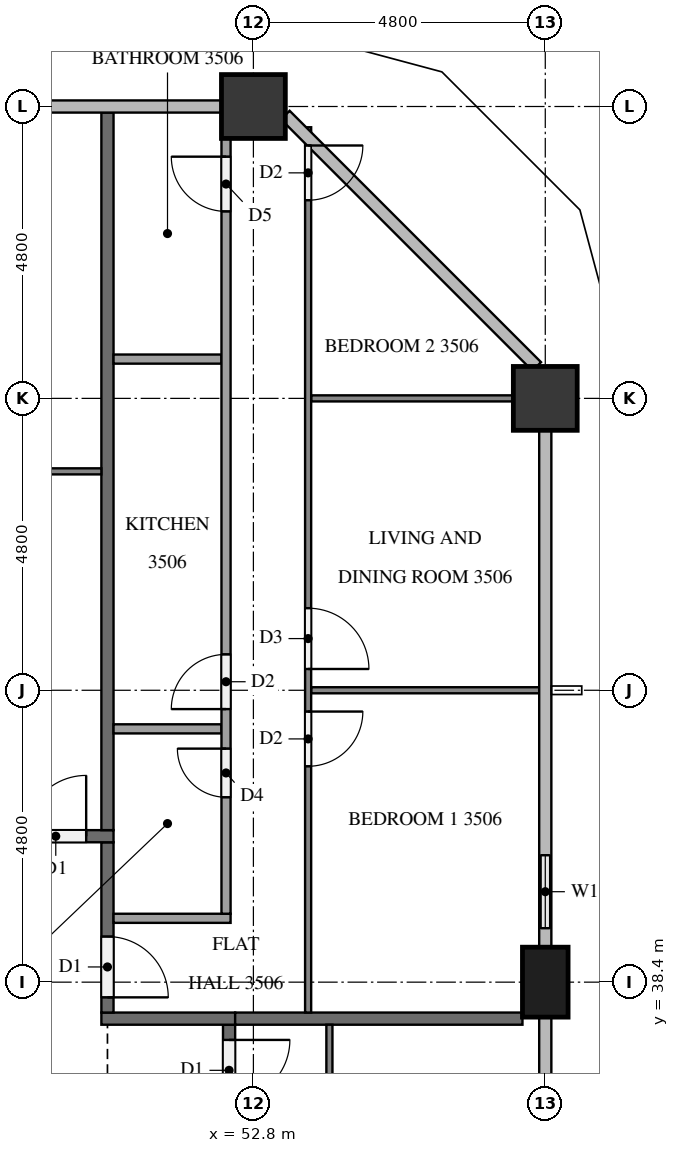
"""IFC4 building model, lengths in metres.
Left out: names, types, materials, properties, quantities, classifications, styles, units other than length and angle.
Written with IfcOpenShell. Run it as: python <this file> out.ifc"""

import sys

from ifc_helpers import new_model, si_unit, direction, frame, frame_2d, origin, origin_2d, place, context, subcontext, project, spatial, rectangle, extrude, element, fill, save


model = new_model("IFC4")
c1 = context("Model", 3, precision=1e-05, world=origin(), true_north=direction((0.0, 1.0)))
c2 = subcontext(c1, "Body", "Model", "MODEL_VIEW")
j1 = project(units=[si_unit("LENGTHUNIT", "METRE"), si_unit("PLANEANGLEUNIT", "RADIAN")], contexts=[c1])
p1 = place(None, origin())
s1 = spatial("IfcSite", under=j1, at=p1, CompositionType="ELEMENT")
p2 = place(p1, origin())
s2 = spatial("IfcBuilding", under=s1, at=p2, CompositionType="ELEMENT")
p3 = place(p2, frame((0.0, 0.0, 136.6)))
s3 = spatial("IfcBuildingStorey", under=s2, at=p3, CompositionType="ELEMENT", Elevation=136.6)
p4 = place(p3, frame((57.6, 38.4, 0.0), z_axis=(0.0, 0.0, 1.0), x_axis=(0.0, 1.0, 0.0)))
e1 = element("IfcColumn", 1, at=p4, inside=s3, PredefinedType="COLUMN", context=c2, shape_type="SweptSolid", body=[
    extrude(rectangle(XDim=1.15, YDim=0.75, at=origin_2d()), origin(), (0.0, 0.0, 1.0), 3.2),
])
for number, where, z_axis, x_axis in (
    (2, (57.6, 48.0, 0.0), (0.0, 0.0, 1.0), (1.0, 0.0, 0.0)),
    (3, (52.8, 52.8, 0.0), (0.0, 0.0, 1.0), (1.0, 0.0, 0.0)),
):
    element("IfcColumn", number, at=place(p3, frame(where, z_axis=z_axis, x_axis=x_axis)), inside=s3, PredefinedType="COLUMN", context=c2, shape_type="SweptSolid", body=[
        extrude(rectangle(XDim=1.05, YDim=1.05, at=origin_2d()), origin(), (0.0, 0.0, 1.0), 3.2),
    ])
p5 = place(p3, frame((57.6, 38.975, 0.0), z_axis=(0.0, 0.0, 1.0), x_axis=(0.0, 1.0, 0.0)))
e4 = element("IfcWall", 4, at=p5, inside=s3, PredefinedType="SOLIDWALL", context=c2, shape_type="SweptSolid", body=[
    extrude(rectangle(XDim=1.825, YDim=0.15, at=frame_2d((0.913, 0.0))), origin(), (0.0, 0.0, 1.0), 3.2),
])
p6 = place(p5, frame((0.312, 0.0, 0.9)))
e5 = element("IfcOpeningElement", 5, at=p6, cuts=e4, PredefinedType="OPENING", context=c2, shape_type="SweptSolid", body=[
    extrude(rectangle(XDim=1.2, YDim=1.4, at=frame_2d((0.6, 0.7))), frame((0.0, 0.085, 0.0), z_axis=(0.0, -1.0, 0.0), x_axis=(1.0, 0.0, 0.0)), (0.0, 0.0, 1.0), 0.17),
])
p7 = place(p3, frame((52.4, 37.7, 0.0), z_axis=(0.0, 0.0, 1.0), x_axis=(0.0, -1.0, 0.0)))
e6 = element("IfcWall", 6, at=p7, inside=s3, PredefinedType="PARTITIONING", context=c2, shape_type="SweptSolid", body=[
    extrude(rectangle(XDim=22.6, YDim=0.2, at=frame_2d((11.3, 0.0))), origin(), (0.0, 0.0, 1.0), 3.2),
])
p8 = place(p7, frame((0.25, 0.0, 0.0)))
e7 = element("IfcOpeningElement", 7, at=p8, cuts=e6, PredefinedType="OPENING", context=c2, shape_type="SweptSolid", body=[
    extrude(rectangle(XDim=1.0, YDim=2.1, at=frame_2d((0.5, 1.05))), frame((0.0, 0.11, 0.0), z_axis=(0.0, -1.0, 0.0), x_axis=(1.0, 0.0, 0.0)), (0.0, 0.0, 1.0), 0.22),
])
p9 = place(p3, frame((52.5, 37.8, 0.0), z_axis=(0.0, 0.0, 1.0), x_axis=(-1.0, 0.0, 0.0)))
e8 = element("IfcWall", 8, at=p9, inside=s3, PredefinedType="PARTITIONING", context=c2, shape_type="SweptSolid", body=[
    extrude(rectangle(XDim=2.2, YDim=0.2, at=frame_2d((1.1, 0.0))), origin(), (0.0, 0.0, 1.0), 3.2),
])
p10 = place(p3, frame((50.4, 40.7, 0.0), z_axis=(0.0, 0.0, 1.0), x_axis=(0.0, -1.0, 0.0)))
e9 = element("IfcWall", 9, at=p10, inside=s3, PredefinedType="PARTITIONING", context=c2, shape_type="SweptSolid", body=[
    extrude(rectangle(XDim=2.8, YDim=0.2, at=frame_2d((1.4, 0.0))), origin(), (0.0, 0.0, 1.0), 3.2),
])
p11 = place(p10, frame((1.55, 0.0, 0.0)))
e10 = element("IfcOpeningElement", 10, at=p11, cuts=e9, PredefinedType="OPENING", context=c2, shape_type="SweptSolid", body=[
    extrude(rectangle(XDim=1.0, YDim=2.1, at=frame_2d((0.5, 1.05))), frame((0.0, 0.11, 0.0), z_axis=(0.0, -1.0, 0.0), x_axis=(1.0, 0.0, 0.0)), (0.0, 0.0, 1.0), 0.22),
])
p12 = place(p3, frame((11.9, 40.8, 0.0), z_axis=(0.0, 0.0, 1.0), x_axis=(1.0, 0.0, 0.0)))
e11 = element("IfcWall", 11, at=p12, inside=s3, PredefinedType="PARTITIONING", context=c2, shape_type="SweptSolid", body=[
    extrude(rectangle(XDim=38.6, YDim=0.2, at=frame_2d((19.3, 0.0))), origin(), (0.0, 0.0, 1.0), 3.2),
])
p13 = place(p12, frame((37.15, 0.0, 0.0)))
e12 = element("IfcOpeningElement", 12, at=p13, cuts=e11, PredefinedType="OPENING", context=c2, shape_type="SweptSolid", body=[
    extrude(rectangle(XDim=1.0, YDim=2.1, at=frame_2d((0.5, 1.05))), frame((0.0, 0.11, 0.0), z_axis=(0.0, -1.0, 0.0), x_axis=(1.0, 0.0, 0.0)), (0.0, 0.0, 1.0), 0.22),
])
p14 = place(p12, frame((10.05, 0.0, 0.0)))
e13 = element("IfcOpeningElement", 13, at=p14, cuts=e11, PredefinedType="OPENING", context=c2, shape_type="SweptSolid", body=[
    extrude(rectangle(XDim=1.0, YDim=2.1, at=frame_2d((0.5, 1.05))), frame((0.0, 0.11, 0.0), z_axis=(0.0, -1.0, 0.0), x_axis=(1.0, 0.0, 0.0)), (0.0, 0.0, 1.0), 0.22),
])
p15 = place(p12, frame((0.45, 0.0, 0.0)))
e14 = element("IfcOpeningElement", 14, at=p15, cuts=e11, PredefinedType="OPENING", context=c2, shape_type="SweptSolid", body=[
    extrude(rectangle(XDim=1.0, YDim=2.1, at=frame_2d((0.5, 1.05))), frame((0.0, 0.11, 0.0), z_axis=(0.0, -1.0, 0.0), x_axis=(1.0, 0.0, 0.0)), (0.0, 0.0, 1.0), 0.22),
])
p16 = place(p3, frame((52.5, 37.8, 0.0), z_axis=(0.0, 0.0, 1.0), x_axis=(1.0, 0.0, 0.0)))
e15 = element("IfcWall", 15, at=p16, inside=s3, PredefinedType="PARTITIONING", context=c2, shape_type="SweptSolid", body=[
    extrude(rectangle(XDim=4.725, YDim=0.2, at=frame_2d((2.363, 0.0))), origin(), (0.0, 0.0, 1.0), 3.2),
])
p17 = place(p3, frame((50.4, 40.9, 0.0), z_axis=(0.0, 0.0, 1.0), x_axis=(0.0, 1.0, 0.0)))
e16 = element("IfcWall", 16, at=p17, inside=s3, PredefinedType="PARTITIONING", context=c2, shape_type="SweptSolid", body=[
    extrude(rectangle(XDim=11.8, YDim=0.2, at=frame_2d((5.9, 0.0))), origin(), (0.0, 0.0, 1.0), 3.2),
])
p18 = place(p3, frame((54.05, 37.7, 0.0), z_axis=(0.0, 0.0, 1.0), x_axis=(0.0, -1.0, 0.0)))
e17 = element("IfcWall", 17, at=p18, inside=s3, PredefinedType="PARTITIONING", context=c2, shape_type="SweptSolid", body=[
    extrude(rectangle(XDim=22.6, YDim=0.1, at=frame_2d((11.3, 0.0))), origin(), (0.0, 0.0, 1.0), 3.2),
])
p19 = place(p18, frame((2.85, 0.0, 0.0)))
e18 = element("IfcOpeningElement", 18, at=p19, cuts=e17, PredefinedType="OPENING", context=c2, shape_type="SweptSolid", body=[
    extrude(rectangle(XDim=0.9, YDim=2.1, at=frame_2d((0.45, 1.05))), frame((0.0, 0.06, 0.0), z_axis=(0.0, -1.0, 0.0), x_axis=(1.0, 0.0, 0.0)), (0.0, 0.0, 1.0), 0.12),
])
p20 = place(p18, frame((4.45, 0.0, 0.0)))
e19 = element("IfcOpeningElement", 19, at=p20, cuts=e17, PredefinedType="OPENING", context=c2, shape_type="SweptSolid", body=[
    extrude(rectangle(XDim=0.8, YDim=2.1, at=frame_2d((0.4, 1.05))), frame((0.0, 0.06, 0.0), z_axis=(0.0, -1.0, 0.0), x_axis=(1.0, 0.0, 0.0)), (0.0, 0.0, 1.0), 0.12),
])
p21 = place(p18, frame((10.05, 0.0, 0.0)))
e20 = element("IfcOpeningElement", 20, at=p21, cuts=e17, PredefinedType="OPENING", context=c2, shape_type="SweptSolid", body=[
    extrude(rectangle(XDim=0.9, YDim=2.1, at=frame_2d((0.45, 1.05))), frame((0.0, 0.06, 0.0), z_axis=(0.0, -1.0, 0.0), x_axis=(1.0, 0.0, 0.0)), (0.0, 0.0, 1.0), 0.12),
])
p22 = place(p18, frame((11.65, 0.0, 0.0)))
e21 = element("IfcOpeningElement", 21, at=p22, cuts=e17, PredefinedType="OPENING", context=c2, shape_type="SweptSolid", body=[
    extrude(rectangle(XDim=0.9, YDim=2.1, at=frame_2d((0.45, 1.05))), frame((0.0, 0.06, 0.0), z_axis=(0.0, -1.0, 0.0), x_axis=(1.0, 0.0, 0.0)), (0.0, 0.0, 1.0), 0.12),
])
p23 = place(p18, frame((19.55, 0.0, 0.0)))
e22 = element("IfcOpeningElement", 22, at=p23, cuts=e17, PredefinedType="OPENING", context=c2, shape_type="SweptSolid", body=[
    extrude(rectangle(XDim=1.0, YDim=2.1, at=frame_2d((0.5, 1.05))), frame((0.0, 0.06, 0.0), z_axis=(0.0, -1.0, 0.0), x_axis=(1.0, 0.0, 0.0)), (0.0, 0.0, 1.0), 0.12),
])
p24 = place(p18, frame((21.25, 0.0, 0.0)))
e23 = element("IfcOpeningElement", 23, at=p24, cuts=e17, PredefinedType="OPENING", context=c2, shape_type="SweptSolid", body=[
    extrude(rectangle(XDim=0.9, YDim=2.1, at=frame_2d((0.45, 1.05))), frame((0.0, 0.06, 0.0), z_axis=(0.0, -1.0, 0.0), x_axis=(1.0, 0.0, 0.0)), (0.0, 0.0, 1.0), 0.12),
])
p25 = place(p3, frame((53.75, 43.2, 0.0), z_axis=(0.0, 0.0, 1.0), x_axis=(1.0, 0.0, 0.0)))
e24 = element("IfcWall", 24, at=p25, inside=s3, PredefinedType="PARTITIONING", context=c2, shape_type="SweptSolid", body=[
    extrude(rectangle(XDim=3.75, YDim=0.1, at=frame_2d((1.875, 0.0))), origin(), (0.0, 0.0, 1.0), 3.2),
])
p26 = place(p3, frame((53.75, 48.0, 0.0), z_axis=(0.0, 0.0, 1.0), x_axis=(1.0, 0.0, 0.0)))
e25 = element("IfcWall", 25, at=p26, inside=s3, PredefinedType="PARTITIONING", context=c2, shape_type="SweptSolid", body=[
    extrude(rectangle(XDim=3.325, YDim=0.1, at=frame_2d((1.663, 0.0))), origin(), (0.0, 0.0, 1.0), 3.2),
])
p27 = place(p3, frame((53.7, 52.459, 0.0), z_axis=(0.0, 0.0, 1.0), x_axis=(0.0, -1.0, 0.0)))
e26 = element("IfcWall", 26, at=p27, inside=s3, PredefinedType="PARTITIONING", context=c2, shape_type="SweptSolid", body=[
    extrude(rectangle(XDim=14.559, YDim=0.1, at=frame_2d((7.279, 0.0))), origin(), (0.0, 0.0, 1.0), 3.2),
])
p28 = place(p27, frame((9.609, 0.0, 0.0)))
e27 = element("IfcOpeningElement", 27, at=p28, cuts=e26, PredefinedType="OPENING", context=c2, shape_type="SweptSolid", body=[
    extrude(rectangle(XDim=0.9, YDim=2.1, at=frame_2d((0.45, 1.05))), frame((0.0, 0.06, 0.0), z_axis=(0.0, -1.0, 0.0), x_axis=(1.0, 0.0, 0.0)), (0.0, 0.0, 1.0), 0.12),
])
p29 = place(p27, frame((7.909, 0.0, 0.0)))
e28 = element("IfcOpeningElement", 28, at=p29, cuts=e26, PredefinedType="OPENING", context=c2, shape_type="SweptSolid", body=[
    extrude(rectangle(XDim=1.0, YDim=2.1, at=frame_2d((0.5, 1.05))), frame((0.0, 0.06, 0.0), z_axis=(0.0, -1.0, 0.0), x_axis=(1.0, 0.0, 0.0)), (0.0, 0.0, 1.0), 0.12),
])
p30 = place(p27, frame((0.3, 0.0, 0.0)))
e29 = element("IfcOpeningElement", 29, at=p30, cuts=e26, PredefinedType="OPENING", context=c2, shape_type="SweptSolid", body=[
    extrude(rectangle(XDim=0.9, YDim=2.1, at=frame_2d((0.45, 1.05))), frame((0.0, 0.06, 0.0), z_axis=(0.0, -1.0, 0.0), x_axis=(1.0, 0.0, 0.0)), (0.0, 0.0, 1.0), 0.12),
])
for number, where, z_axis, x_axis in (
    (30, (50.5, 42.565, 0.0), (0.0, 0.0, 1.0), (1.0, 0.0, 0.0)),
    (31, (50.5, 48.646, 0.0), (0.0, 0.0, 1.0), (1.0, 0.0, 0.0)),
):
    element("IfcWall", number, at=place(p3, frame(where, z_axis=z_axis, x_axis=x_axis)), inside=s3, PredefinedType="PARTITIONING", context=c2, shape_type="SweptSolid", body=[
        extrude(rectangle(XDim=1.775, YDim=0.15, at=frame_2d((0.887, 0.0))), origin(), (0.0, 0.0, 1.0), 3.2),
    ])
p31 = place(p3, frame((50.5, 39.45, 0.0), z_axis=(0.0, 0.0, 1.0), x_axis=(1.0, 0.0, 0.0)))
e32 = element("IfcWall", 32, at=p31, inside=s3, PredefinedType="PARTITIONING", context=c2, shape_type="SweptSolid", body=[
    extrude(rectangle(XDim=1.925, YDim=0.15, at=frame_2d((0.962, 0.0))), origin(), (0.0, 0.0, 1.0), 3.2),
])
p32 = place(p3, frame((52.35, 39.525, 0.0), z_axis=(0.0, 0.0, 1.0), x_axis=(0.0, 1.0, 0.0)))
e33 = element("IfcWall", 33, at=p32, inside=s3, PredefinedType="PARTITIONING", context=c2, shape_type="SweptSolid", body=[
    extrude(rectangle(XDim=12.75, YDim=0.15, at=frame_2d((6.375, 0.0))), origin(), (0.0, 0.0, 1.0), 3.2),
])
p33 = place(p32, frame((1.915, 0.0, 0.0)))
e34 = element("IfcOpeningElement", 34, at=p33, cuts=e33, PredefinedType="OPENING", context=c2, shape_type="SweptSolid", body=[
    extrude(rectangle(XDim=0.8, YDim=2.1, at=frame_2d((0.4, 1.05))), frame((0.0, 0.085, 0.0), z_axis=(0.0, -1.0, 0.0), x_axis=(1.0, 0.0, 0.0)), (0.0, 0.0, 1.0), 0.17),
])
p34 = place(p32, frame((3.365, 0.0, 0.0)))
e35 = element("IfcOpeningElement", 35, at=p34, cuts=e33, PredefinedType="OPENING", context=c2, shape_type="SweptSolid", body=[
    extrude(rectangle(XDim=0.9, YDim=2.1, at=frame_2d((0.45, 1.05))), frame((0.0, 0.085, 0.0), z_axis=(0.0, -1.0, 0.0), x_axis=(1.0, 0.0, 0.0)), (0.0, 0.0, 1.0), 0.17),
])
p35 = place(p32, frame((11.55, 0.0, 0.0)))
e36 = element("IfcOpeningElement", 36, at=p35, cuts=e33, PredefinedType="OPENING", context=c2, shape_type="SweptSolid", body=[
    extrude(rectangle(XDim=0.9, YDim=2.1, at=frame_2d((0.45, 1.05))), frame((0.0, 0.085, 0.0), z_axis=(0.0, -1.0, 0.0), x_axis=(1.0, 0.0, 0.0)), (0.0, 0.0, 1.0), 0.17),
])
p36 = place(p3, frame((36.1, 46.8, 0.0), z_axis=(0.0, 0.0, 1.0), x_axis=(1.0, 0.0, 0.0)))
e37 = element("IfcWall", 37, at=p36, inside=s3, PredefinedType="PARTITIONING", context=c2, shape_type="SweptSolid", body=[
    extrude(rectangle(XDim=14.2, YDim=0.1, at=frame_2d((7.1, 0.0))), origin(), (0.0, 0.0, 1.0), 3.2),
])
p37 = place(p36, frame((9.85, 0.0, 0.0)))
e38 = element("IfcOpeningElement", 38, at=p37, cuts=e37, PredefinedType="OPENING", context=c2, shape_type="SweptSolid", body=[
    extrude(rectangle(XDim=0.9, YDim=2.1, at=frame_2d((0.45, 1.05))), frame((0.0, 0.06, 0.0), z_axis=(0.0, -1.0, 0.0), x_axis=(1.0, 0.0, 0.0)), (0.0, 0.0, 1.0), 0.12),
])
p38 = place(p36, frame((8.15, 0.0, 0.0)))
e39 = element("IfcOpeningElement", 39, at=p38, cuts=e37, PredefinedType="OPENING", context=c2, shape_type="SweptSolid", body=[
    extrude(rectangle(XDim=1.0, YDim=2.1, at=frame_2d((0.5, 1.05))), frame((0.0, 0.06, 0.0), z_axis=(0.0, -1.0, 0.0), x_axis=(1.0, 0.0, 0.0)), (0.0, 0.0, 1.0), 0.12),
])
p39 = place(p36, frame((0.3, 0.0, 0.0)))
e40 = element("IfcOpeningElement", 40, at=p39, cuts=e37, PredefinedType="OPENING", context=c2, shape_type="SweptSolid", body=[
    extrude(rectangle(XDim=0.9, YDim=2.1, at=frame_2d((0.45, 1.05))), frame((0.0, 0.06, 0.0), z_axis=(0.0, -1.0, 0.0), x_axis=(1.0, 0.0, 0.0)), (0.0, 0.0, 1.0), 0.12),
])
p40 = place(p6, origin())
e41 = element("IfcWindow", 41, at=p40, inside=s3, PartitioningType="SINGLE_PANEL", PredefinedType="WINDOW", context=c2, shape_type="SweptSolid", body=[
    extrude(rectangle(XDim=1.2, YDim=1.4, at=frame_2d((0.6, 0.7))), frame((0.0, 0.03, 0.0), z_axis=(0.0, -1.0, 0.0), x_axis=(1.0, 0.0, 0.0)), (0.0, 0.0, 1.0), 0.06),
])
fill(e5, e41)
p41 = place(p8, origin())
e42 = element("IfcDoor", 42, at=p41, inside=s3, OperationType="SINGLE_SWING_LEFT", PredefinedType="DOOR", context=c2, shape_type="SweptSolid", body=[
    extrude(rectangle(XDim=1.0, YDim=2.1, at=frame_2d((0.5, 1.05))), frame((0.0, 0.025, 0.0), z_axis=(0.0, -1.0, 0.0), x_axis=(1.0, 0.0, 0.0)), (0.0, 0.0, 1.0), 0.05),
])
fill(e7, e42)
p42 = place(p11, origin())
e43 = element("IfcDoor", 43, at=p42, inside=s3, OperationType="SINGLE_SWING_RIGHT", PredefinedType="DOOR", context=c2, shape_type="SweptSolid", body=[
    extrude(rectangle(XDim=1.0, YDim=2.1, at=frame_2d((0.5, 1.05))), frame((0.0, 0.025, 0.0), z_axis=(0.0, -1.0, 0.0), x_axis=(1.0, 0.0, 0.0)), (0.0, 0.0, 1.0), 0.05),
])
fill(e10, e43)
p43 = place(p13, origin())
e44 = element("IfcDoor", 44, at=p43, inside=s3, OperationType="SINGLE_SWING_RIGHT", PredefinedType="DOOR", context=c2, shape_type="SweptSolid", body=[
    extrude(rectangle(XDim=1.0, YDim=2.1, at=frame_2d((0.5, 1.05))), frame((0.0, 0.025, 0.0), z_axis=(0.0, -1.0, 0.0), x_axis=(1.0, 0.0, 0.0)), (0.0, 0.0, 1.0), 0.05),
])
fill(e12, e44)
p44 = place(p28, origin())
e45 = element("IfcDoor", 45, at=p44, inside=s3, OperationType="SINGLE_SWING_LEFT", PredefinedType="DOOR", context=c2, shape_type="SweptSolid", body=[
    extrude(rectangle(XDim=0.9, YDim=2.1, at=frame_2d((0.45, 1.05))), frame((0.0, 0.025, 0.0), z_axis=(0.0, -1.0, 0.0), x_axis=(1.0, 0.0, 0.0)), (0.0, 0.0, 1.0), 0.05),
])
fill(e27, e45)
p45 = place(p29, origin())
e46 = element("IfcDoor", 46, at=p45, inside=s3, OperationType="SINGLE_SWING_RIGHT", PredefinedType="DOOR", context=c2, shape_type="SweptSolid", body=[
    extrude(rectangle(XDim=1.0, YDim=2.1, at=frame_2d((0.5, 1.05))), frame((0.0, 0.025, 0.0), z_axis=(0.0, -1.0, 0.0), x_axis=(1.0, 0.0, 0.0)), (0.0, 0.0, 1.0), 0.05),
])
fill(e28, e46)
p46 = place(p30, origin())
e47 = element("IfcDoor", 47, at=p46, inside=s3, OperationType="SINGLE_SWING_LEFT", PredefinedType="DOOR", context=c2, shape_type="SweptSolid", body=[
    extrude(rectangle(XDim=0.9, YDim=2.1, at=frame_2d((0.45, 1.05))), frame((0.0, 0.025, 0.0), z_axis=(0.0, -1.0, 0.0), x_axis=(1.0, 0.0, 0.0)), (0.0, 0.0, 1.0), 0.05),
])
fill(e29, e47)
p47 = place(p33, origin())
e48 = element("IfcDoor", 48, at=p47, inside=s3, OperationType="SINGLE_SWING_RIGHT", PredefinedType="DOOR", context=c2, shape_type="SweptSolid", body=[
    extrude(rectangle(XDim=0.8, YDim=2.1, at=frame_2d((0.4, 1.05))), frame((0.0, 0.025, 0.0), z_axis=(0.0, -1.0, 0.0), x_axis=(1.0, 0.0, 0.0)), (0.0, 0.0, 1.0), 0.05),
])
fill(e34, e48)
p48 = place(p34, origin())
e49 = element("IfcDoor", 49, at=p48, inside=s3, OperationType="SINGLE_SWING_LEFT", PredefinedType="DOOR", context=c2, shape_type="SweptSolid", body=[
    extrude(rectangle(XDim=0.9, YDim=2.1, at=frame_2d((0.45, 1.05))), frame((0.0, 0.025, 0.0), z_axis=(0.0, -1.0, 0.0), x_axis=(1.0, 0.0, 0.0)), (0.0, 0.0, 1.0), 0.05),
])
fill(e35, e49)
p49 = place(p35, origin())
e50 = element("IfcDoor", 50, at=p49, inside=s3, OperationType="SINGLE_SWING_RIGHT", PredefinedType="DOOR", context=c2, shape_type="SweptSolid", body=[
    extrude(rectangle(XDim=0.9, YDim=2.1, at=frame_2d((0.45, 1.05))), frame((0.0, 0.025, 0.0), z_axis=(0.0, -1.0, 0.0), x_axis=(1.0, 0.0, 0.0)), (0.0, 0.0, 1.0), 0.05),
])
fill(e36, e50)
save(model, sys.argv[1])
